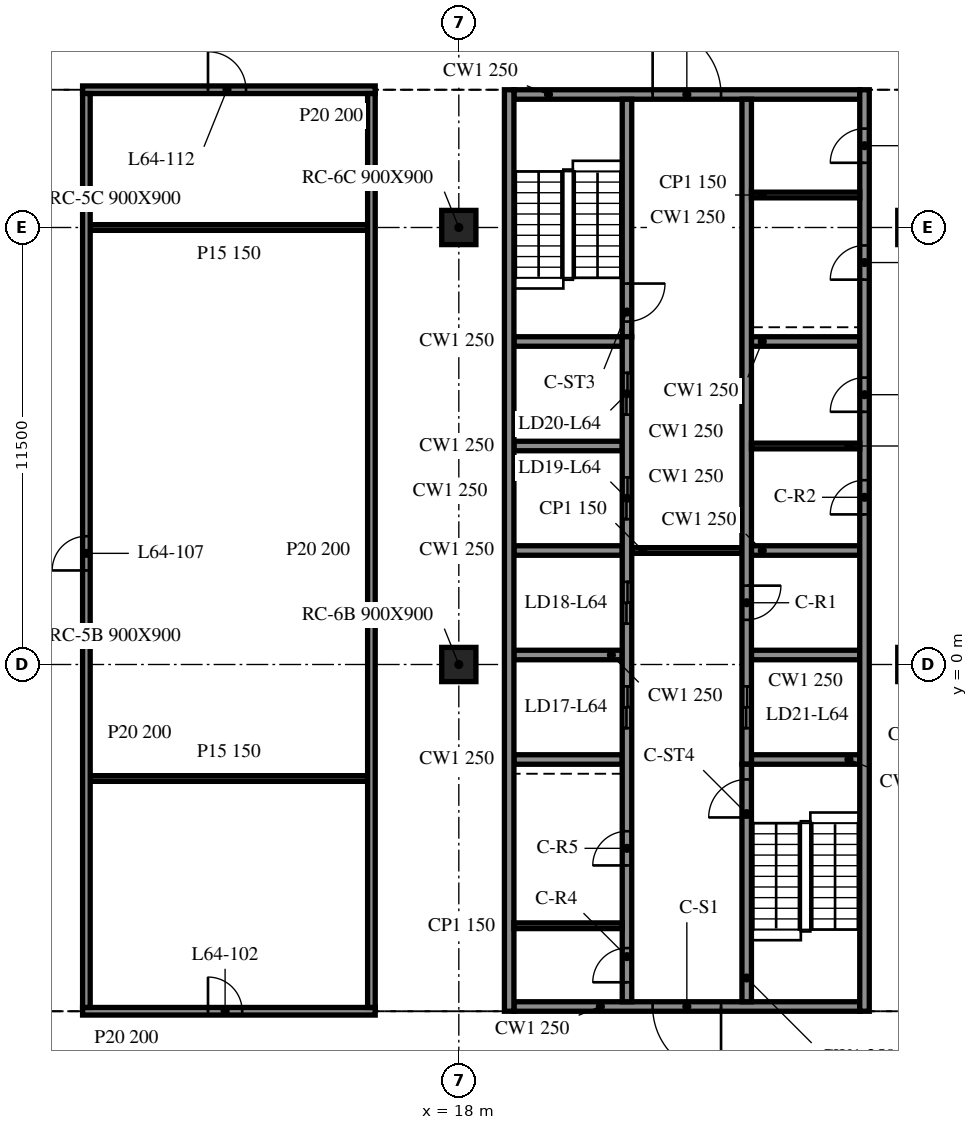
"""IFC4 building model, lengths in metres.
Left out: names, types, materials, properties, quantities, classifications, styles, units other than length and angle.
Written with IfcOpenShell. Run it as: python <this file> out.ifc"""

import sys

from ifc_helpers import new_model, si_unit, direction, frame, frame_2d, origin, origin_2d, place, context, subcontext, project, spatial, rectangle, extrude, element, fill, save


model = new_model("IFC4")
c1 = context("Model", 3, precision=1e-05, world=origin(), true_north=direction((0.0, 1.0)))
c2 = subcontext(c1, "Body", "Model", "MODEL_VIEW")
j1 = project(units=[si_unit("LENGTHUNIT", "METRE"), si_unit("PLANEANGLEUNIT", "RADIAN")], contexts=[c1])
p1 = place(None, origin())
s1 = spatial("IfcSite", under=j1, at=p1, CompositionType="ELEMENT")
p2 = place(p1, origin())
s2 = spatial("IfcBuilding", under=s1, at=p2, CompositionType="ELEMENT")
p3 = place(p2, frame((0.0, 0.0, 263.3)))
s3 = spatial("IfcBuildingStorey", under=s2, at=p3, CompositionType="ELEMENT", Elevation=263.3)
for number, where, z_axis, x_axis in (
    (1, (18.0, 0.0, -0.34), (0.0, 0.0, 1.0), (1.0, 0.0, 0.0)),
    (2, (18.0, 11.5, -0.34), (0.0, 0.0, 1.0), (1.0, 0.0, 0.0)),
):
    element("IfcColumn", number, at=place(p3, frame(where, z_axis=z_axis, x_axis=x_axis)), inside=s3, PredefinedType="COLUMN", context=c2, shape_type="SweptSolid", body=[
        extrude(rectangle(XDim=0.9, YDim=0.9, at=origin_2d()), origin(), (0.0, 0.0, 1.0), 3.8),
    ])
p4 = place(p3, frame((19.325, 15.125, 0.0), z_axis=(0.0, 0.0, 1.0), x_axis=(0.0, -1.0, 0.0)))
e3 = element("IfcWall", 3, at=p4, inside=s3, PredefinedType="SOLIDWALL", context=c2, shape_type="SweptSolid", body=[
    extrude(rectangle(XDim=24.25, YDim=0.25, at=frame_2d((12.125, 0.0))), origin(), (0.0, 0.0, 1.0), 3.46),
])
p5 = place(p3, frame((28.675, -9.125, 0.0), z_axis=(0.0, 0.0, 1.0), x_axis=(0.0, 1.0, 0.0)))
e4 = element("IfcWall", 4, at=p5, inside=s3, PredefinedType="SOLIDWALL", context=c2, shape_type="SweptSolid", body=[
    extrude(rectangle(XDim=24.25, YDim=0.25, at=frame_2d((12.125, 0.0))), origin(), (0.0, 0.0, 1.0), 3.46),
])
p6 = place(p5, frame((13.075, 0.0, 0.0)))
e5 = element("IfcOpeningElement", 5, at=p6, cuts=e4, PredefinedType="OPENING", context=c2, shape_type="SweptSolid", body=[
    extrude(rectangle(XDim=0.9, YDim=2.1, at=frame_2d((0.45, 1.05))), frame((0.0, 0.135, 0.0), z_axis=(0.0, -1.0, 0.0), x_axis=(1.0, 0.0, 0.0)), (0.0, 0.0, 1.0), 0.27),
])
p7 = place(p5, frame((15.775, 0.0, 0.0)))
e6 = element("IfcOpeningElement", 6, at=p7, cuts=e4, PredefinedType="OPENING", context=c2, shape_type="SweptSolid", body=[
    extrude(rectangle(XDim=0.9, YDim=2.1, at=frame_2d((0.45, 1.05))), frame((0.0, 0.135, 0.0), z_axis=(0.0, -1.0, 0.0), x_axis=(1.0, 0.0, 0.0)), (0.0, 0.0, 1.0), 0.27),
])
p8 = place(p5, frame((19.252, 0.0, 0.0)))
e7 = element("IfcOpeningElement", 7, at=p8, cuts=e4, PredefinedType="OPENING", context=c2, shape_type="SweptSolid", body=[
    extrude(rectangle(XDim=0.9, YDim=2.1, at=frame_2d((0.45, 1.05))), frame((0.0, 0.135, 0.0), z_axis=(0.0, -1.0, 0.0), x_axis=(1.0, 0.0, 0.0)), (0.0, 0.0, 1.0), 0.27),
])
p9 = place(p5, frame((22.327, 0.0, 0.0)))
e8 = element("IfcOpeningElement", 8, at=p9, cuts=e4, PredefinedType="OPENING", context=c2, shape_type="SweptSolid", body=[
    extrude(rectangle(XDim=0.9, YDim=2.1, at=frame_2d((0.45, 1.05))), frame((0.0, 0.135, 0.0), z_axis=(0.0, -1.0, 0.0), x_axis=(1.0, 0.0, 0.0)), (0.0, 0.0, 1.0), 0.27),
])
p10 = place(p3, frame((28.55, -9.0, 0.0), z_axis=(0.0, 0.0, 1.0), x_axis=(-1.0, 0.0, 0.0)))
e9 = element("IfcWall", 9, at=p10, inside=s3, PredefinedType="SOLIDWALL", context=c2, shape_type="SweptSolid", body=[
    extrude(rectangle(XDim=9.1, YDim=0.25, at=frame_2d((4.55, 0.0))), origin(), (0.0, 0.0, 1.0), 3.46),
])
p11 = place(p10, frame((3.65, 0.0, 0.0)))
e10 = element("IfcOpeningElement", 10, at=p11, cuts=e9, PredefinedType="OPENING", context=c2, shape_type="SweptSolid", body=[
    extrude(rectangle(XDim=1.8, YDim=2.1, at=frame_2d((0.9, 1.05))), frame((0.0, 0.135, 0.0), z_axis=(0.0, -1.0, 0.0), x_axis=(1.0, 0.0, 0.0)), (0.0, 0.0, 1.0), 0.27),
])
p12 = place(p3, frame((19.45, 15.0, 0.0), z_axis=(0.0, 0.0, 1.0), x_axis=(1.0, 0.0, 0.0)))
e11 = element("IfcWall", 11, at=p12, inside=s3, PredefinedType="SOLIDWALL", context=c2, shape_type="SweptSolid", body=[
    extrude(rectangle(XDim=9.1, YDim=0.25, at=frame_2d((4.55, 0.0))), origin(), (0.0, 0.0, 1.0), 3.46),
])
p13 = place(p12, frame((3.65, 0.0, 0.0)))
e12 = element("IfcOpeningElement", 12, at=p13, cuts=e11, PredefinedType="OPENING", context=c2, shape_type="SweptSolid", body=[
    extrude(rectangle(XDim=1.8, YDim=2.1, at=frame_2d((0.9, 1.05))), frame((0.0, 0.135, 0.0), z_axis=(0.0, -1.0, 0.0), x_axis=(1.0, 0.0, 0.0)), (0.0, 0.0, 1.0), 0.27),
])
p14 = place(p3, frame((22.425, -8.875, 0.0), z_axis=(0.0, 0.0, 1.0), x_axis=(0.0, 1.0, 0.0)))
e13 = element("IfcWall", 13, at=p14, inside=s3, PredefinedType="SOLIDWALL", context=c2, shape_type="SweptSolid", body=[
    extrude(rectangle(XDim=17.5, YDim=0.25, at=frame_2d((8.75, 0.0))), origin(), (0.0, 0.0, 1.0), 3.46),
])
p15 = place(p14, frame((7.2, 0.0, 0.0)))
e14 = element("IfcOpeningElement", 14, at=p15, cuts=e13, PredefinedType="OPENING", context=c2, shape_type="SweptSolid", body=[
    extrude(rectangle(XDim=1.1, YDim=2.1, at=frame_2d((0.55, 1.05))), frame((0.0, 0.135, 0.0), z_axis=(0.0, -1.0, 0.0), x_axis=(1.0, 0.0, 0.0)), (0.0, 0.0, 1.0), 0.27),
])
p16 = place(p14, frame((9.95, 0.0, 0.0)))
e15 = element("IfcOpeningElement", 15, at=p16, cuts=e13, PredefinedType="OPENING", context=c2, shape_type="SweptSolid", body=[
    extrude(rectangle(XDim=1.1, YDim=2.1, at=frame_2d((0.55, 1.05))), frame((0.0, 0.135, 0.0), z_axis=(0.0, -1.0, 0.0), x_axis=(1.0, 0.0, 0.0)), (0.0, 0.0, 1.0), 0.27),
])
p17 = place(p14, frame((12.7, 0.0, 0.0)))
e16 = element("IfcOpeningElement", 16, at=p17, cuts=e13, PredefinedType="OPENING", context=c2, shape_type="SweptSolid", body=[
    extrude(rectangle(XDim=1.1, YDim=2.1, at=frame_2d((0.55, 1.05))), frame((0.0, 0.135, 0.0), z_axis=(0.0, -1.0, 0.0), x_axis=(1.0, 0.0, 0.0)), (0.0, 0.0, 1.0), 0.27),
])
p18 = place(p14, frame((15.45, 0.0, 0.0)))
e17 = element("IfcOpeningElement", 17, at=p18, cuts=e13, PredefinedType="OPENING", context=c2, shape_type="SweptSolid", body=[
    extrude(rectangle(XDim=1.1, YDim=2.1, at=frame_2d((0.55, 1.05))), frame((0.0, 0.135, 0.0), z_axis=(0.0, -1.0, 0.0), x_axis=(1.0, 0.0, 0.0)), (0.0, 0.0, 1.0), 0.27),
])
p19 = place(p14, frame((0.512, 0.0, 0.0)))
e18 = element("IfcOpeningElement", 18, at=p19, cuts=e13, PredefinedType="OPENING", context=c2, shape_type="SweptSolid", body=[
    extrude(rectangle(XDim=0.9, YDim=2.1, at=frame_2d((0.45, 1.05))), frame((0.0, 0.135, 0.0), z_axis=(0.0, -1.0, 0.0), x_axis=(1.0, 0.0, 0.0)), (0.0, 0.0, 1.0), 0.27),
])
p20 = place(p14, frame((3.587, 0.0, 0.0)))
e19 = element("IfcOpeningElement", 19, at=p20, cuts=e13, PredefinedType="OPENING", context=c2, shape_type="SweptSolid", body=[
    extrude(rectangle(XDim=0.9, YDim=2.1, at=frame_2d((0.45, 1.05))), frame((0.0, 0.135, 0.0), z_axis=(0.0, -1.0, 0.0), x_axis=(1.0, 0.0, 0.0)), (0.0, 0.0, 1.0), 0.27),
])
p21 = place(p3, frame((22.425, 14.875, 0.0), z_axis=(0.0, 0.0, 1.0), x_axis=(0.0, -1.0, 0.0)))
e20 = element("IfcWall", 20, at=p21, inside=s3, PredefinedType="SOLIDWALL", context=c2, shape_type="SweptSolid", body=[
    extrude(rectangle(XDim=6.25, YDim=0.25, at=frame_2d((3.125, 0.0))), origin(), (0.0, 0.0, 1.0), 3.46),
])
p22 = place(p21, frame((4.85, 0.0, 0.0)))
e21 = element("IfcOpeningElement", 21, at=p22, cuts=e20, PredefinedType="OPENING", context=c2, shape_type="SweptSolid", body=[
    extrude(rectangle(XDim=1.0, YDim=2.1, at=frame_2d((0.5, 1.05))), frame((0.0, 0.135, 0.0), z_axis=(0.0, -1.0, 0.0), x_axis=(1.0, 0.0, 0.0)), (0.0, 0.0, 1.0), 0.27),
])
p23 = place(p3, frame((25.575, -8.875, 0.0), z_axis=(0.0, 0.0, 1.0), x_axis=(0.0, 1.0, 0.0)))
e22 = element("IfcWall", 22, at=p23, inside=s3, PredefinedType="SOLIDWALL", context=c2, shape_type="SweptSolid", body=[
    extrude(rectangle(XDim=6.25, YDim=0.25, at=frame_2d((3.125, 0.0))), origin(), (0.0, 0.0, 1.0), 3.46),
])
p24 = place(p23, frame((4.85, 0.0, 0.0)))
e23 = element("IfcOpeningElement", 23, at=p24, cuts=e22, PredefinedType="OPENING", context=c2, shape_type="SweptSolid", body=[
    extrude(rectangle(XDim=1.0, YDim=2.1, at=frame_2d((0.5, 1.05))), frame((0.0, 0.135, 0.0), z_axis=(0.0, -1.0, 0.0), x_axis=(1.0, 0.0, 0.0)), (0.0, 0.0, 1.0), 0.27),
])
p25 = place(p3, frame((25.575, 14.875, 0.0), z_axis=(0.0, 0.0, 1.0), x_axis=(0.0, -1.0, 0.0)))
e24 = element("IfcWall", 24, at=p25, inside=s3, PredefinedType="SOLIDWALL", context=c2, shape_type="SweptSolid", body=[
    extrude(rectangle(XDim=17.5, YDim=0.25, at=frame_2d((8.75, 0.0))), origin(), (0.0, 0.0, 1.0), 3.46),
])
p26 = place(p25, frame((15.45, 0.0, 0.0)))
e25 = element("IfcOpeningElement", 25, at=p26, cuts=e24, PredefinedType="OPENING", context=c2, shape_type="SweptSolid", body=[
    extrude(rectangle(XDim=1.1, YDim=2.1, at=frame_2d((0.55, 1.05))), frame((0.0, 0.135, 0.0), z_axis=(0.0, -1.0, 0.0), x_axis=(1.0, 0.0, 0.0)), (0.0, 0.0, 1.0), 0.27),
])
p27 = place(p25, frame((12.8, 0.0, 0.0)))
e26 = element("IfcOpeningElement", 26, at=p27, cuts=e24, PredefinedType="OPENING", context=c2, shape_type="SweptSolid", body=[
    extrude(rectangle(XDim=0.9, YDim=2.1, at=frame_2d((0.45, 1.05))), frame((0.0, 0.135, 0.0), z_axis=(0.0, -1.0, 0.0), x_axis=(1.0, 0.0, 0.0)), (0.0, 0.0, 1.0), 0.27),
])
for number, where, z_axis, x_axis in (
    (27, (19.45, -2.5, 0.0), (0.0, 0.0, 1.0), (1.0, 0.0, 0.0)),
    (28, (19.45, 0.25, 0.0), (0.0, 0.0, 1.0), (1.0, 0.0, 0.0)),
    (29, (19.45, 3.0, 0.0), (0.0, 0.0, 1.0), (1.0, 0.0, 0.0)),
    (30, (19.45, 5.75, 0.0), (0.0, 0.0, 1.0), (1.0, 0.0, 0.0)),
    (31, (19.45, 8.5, 0.0), (0.0, 0.0, 1.0), (1.0, 0.0, 0.0)),
    (32, (25.7, -2.5, 0.0), (0.0, 0.0, 1.0), (1.0, 0.0, 0.0)),
    (33, (25.7, 0.25, 0.0), (0.0, 0.0, 1.0), (1.0, 0.0, 0.0)),
    (34, (25.7, 3.0, 0.0), (0.0, 0.0, 1.0), (1.0, 0.0, 0.0)),
    (35, (25.7, 8.5, 0.0), (0.0, 0.0, 1.0), (1.0, 0.0, 0.0)),
):
    element("IfcWall", number, at=place(p3, frame(where, z_axis=z_axis, x_axis=x_axis)), inside=s3, PredefinedType="SOLIDWALL", context=c2, shape_type="SweptSolid", body=[
        extrude(rectangle(XDim=2.85, YDim=0.25, at=frame_2d((1.425, 0.0))), origin(), (0.0, 0.0, 1.0), 3.46),
    ])
p28 = place(p3, frame((22.55, 3.0, 0.0), z_axis=(0.0, 0.0, 1.0), x_axis=(1.0, 0.0, 0.0)))
e36 = element("IfcWall", 36, at=p28, inside=s3, PredefinedType="PARTITIONING", context=c2, shape_type="SweptSolid", body=[
    extrude(rectangle(XDim=2.9, YDim=0.15, at=frame_2d((1.45, 0.0))), origin(), (0.0, 0.0, 1.0), 3.46),
])
for number, where, z_axis, x_axis in (
    (37, (25.7, 5.75, 0.0), (0.0, 0.0, 1.0), (1.0, 0.0, 0.0)),
    (38, (19.45, -6.875, 0.0), (0.0, 0.0, 1.0), (1.0, 0.0, 0.0)),
    (39, (25.7, 12.355, 0.0), (0.0, 0.0, 1.0), (1.0, 0.0, 0.0)),
):
    element("IfcWall", number, at=place(p3, frame(where, z_axis=z_axis, x_axis=x_axis)), inside=s3, PredefinedType="PARTITIONING", context=c2, shape_type="SweptSolid", body=[
        extrude(rectangle(XDim=2.85, YDim=0.15, at=frame_2d((1.425, 0.0))), origin(), (0.0, 0.0, 1.0), 3.46),
    ])
p29 = place(p3, frame((8.1, -9.125, 0.0), z_axis=(0.0, 0.0, 1.0), x_axis=(1.0, 0.0, 0.0)))
e40 = element("IfcWall", 40, at=p29, inside=s3, PredefinedType="PARTITIONING", context=c2, shape_type="SweptSolid", body=[
    extrude(rectangle(XDim=7.7, YDim=0.2, at=frame_2d((3.85, 0.0))), origin(), (0.0, 0.0, 1.0), 3.46),
])
p30 = place(p29, frame((3.3, 0.0, 0.0)))
e41 = element("IfcOpeningElement", 41, at=p30, cuts=e40, PredefinedType="OPENING", context=c2, shape_type="SweptSolid", body=[
    extrude(rectangle(XDim=0.9, YDim=2.1, at=frame_2d((0.45, 1.05))), frame((0.0, 0.11, 0.0), z_axis=(0.0, -1.0, 0.0), x_axis=(1.0, 0.0, 0.0)), (0.0, 0.0, 1.0), 0.22),
])
for number, where, z_axis, x_axis in (
    (42, (8.3, -3.0, 0.0), (0.0, 0.0, 1.0), (1.0, 0.0, 0.0)),
    (43, (8.3, 11.5, 0.0), (0.0, 0.0, 1.0), (1.0, 0.0, 0.0)),
):
    element("IfcWall", number, at=place(p3, frame(where, z_axis=z_axis, x_axis=x_axis)), inside=s3, PredefinedType="PARTITIONING", context=c2, shape_type="SweptSolid", body=[
        extrude(rectangle(XDim=7.3, YDim=0.15, at=frame_2d((3.65, 0.0))), origin(), (0.0, 0.0, 1.0), 3.46),
    ])
p31 = place(p3, frame((8.1, 15.125, 0.0), z_axis=(0.0, 0.0, 1.0), x_axis=(1.0, 0.0, 0.0)))
e44 = element("IfcWall", 44, at=p31, inside=s3, PredefinedType="PARTITIONING", context=c2, shape_type="SweptSolid", body=[
    extrude(rectangle(XDim=7.7, YDim=0.2, at=frame_2d((3.85, 0.0))), origin(), (0.0, 0.0, 1.0), 3.46),
])
p32 = place(p31, frame((3.3, 0.0, 0.0)))
e45 = element("IfcOpeningElement", 45, at=p32, cuts=e44, PredefinedType="OPENING", context=c2, shape_type="SweptSolid", body=[
    extrude(rectangle(XDim=1.0, YDim=2.1, at=frame_2d((0.5, 1.05))), frame((0.0, 0.11, 0.0), z_axis=(0.0, -1.0, 0.0), x_axis=(1.0, 0.0, 0.0)), (0.0, 0.0, 1.0), 0.22),
])
p33 = place(p3, frame((8.2, -9.025, 0.0), z_axis=(0.0, 0.0, 1.0), x_axis=(0.0, 1.0, 0.0)))
e46 = element("IfcWall", 46, at=p33, inside=s3, PredefinedType="PARTITIONING", context=c2, shape_type="SweptSolid", body=[
    extrude(rectangle(XDim=24.05, YDim=0.2, at=frame_2d((12.025, 0.0))), origin(), (0.0, 0.0, 1.0), 3.46),
])
p34 = place(p33, frame((11.5, 0.0, 0.0)))
e47 = element("IfcOpeningElement", 47, at=p34, cuts=e46, PredefinedType="OPENING", context=c2, shape_type="SweptSolid", body=[
    extrude(rectangle(XDim=0.9, YDim=2.1, at=frame_2d((0.45, 1.05))), frame((0.0, 0.11, 0.0), z_axis=(0.0, -1.0, 0.0), x_axis=(1.0, 0.0, 0.0)), (0.0, 0.0, 1.0), 0.22),
])
p35 = place(p3, frame((15.7, -9.025, 0.0), z_axis=(0.0, 0.0, 1.0), x_axis=(0.0, 1.0, 0.0)))
e48 = element("IfcWall", 48, at=p35, inside=s3, PredefinedType="PARTITIONING", context=c2, shape_type="SweptSolid", body=[
    extrude(rectangle(XDim=24.05, YDim=0.2, at=frame_2d((12.025, 0.0))), origin(), (0.0, 0.0, 1.0), 3.46),
])
p36 = place(p11, origin())
e49 = element("IfcDoor", 49, at=p36, inside=s3, OperationType="DOUBLE_DOOR_SINGLE_SWING", PredefinedType="DOOR", context=c2, shape_type="SweptSolid", body=[
    extrude(rectangle(XDim=1.8, YDim=2.1, at=frame_2d((0.9, 1.05))), frame((0.0, 0.025, 0.0), z_axis=(0.0, -1.0, 0.0), x_axis=(1.0, 0.0, 0.0)), (0.0, 0.0, 1.0), 0.05),
])
fill(e10, e49)
p37 = place(p13, origin())
e50 = element("IfcDoor", 50, at=p37, inside=s3, OperationType="DOUBLE_DOOR_SINGLE_SWING", PredefinedType="DOOR", context=c2, shape_type="SweptSolid", body=[
    extrude(rectangle(XDim=1.8, YDim=2.1, at=frame_2d((0.9, 1.05))), frame((0.0, 0.025, 0.0), z_axis=(0.0, -1.0, 0.0), x_axis=(1.0, 0.0, 0.0)), (0.0, 0.0, 1.0), 0.05),
])
fill(e12, e50)
p38 = place(p26, origin())
e51 = element("IfcDoor", 51, at=p38, inside=s3, OperationType="DOUBLE_DOOR_SLIDING", PredefinedType="DOOR", context=c2, shape_type="SweptSolid", body=[
    extrude(rectangle(XDim=1.1, YDim=2.1, at=frame_2d((0.55, 1.05))), frame((0.0, 0.025, 0.0), z_axis=(0.0, -1.0, 0.0), x_axis=(1.0, 0.0, 0.0)), (0.0, 0.0, 1.0), 0.05),
])
fill(e25, e51)
p39 = place(p15, origin())
e52 = element("IfcDoor", 52, at=p39, inside=s3, OperationType="DOUBLE_DOOR_SLIDING", PredefinedType="DOOR", context=c2, shape_type="SweptSolid", body=[
    extrude(rectangle(XDim=1.1, YDim=2.1, at=frame_2d((0.55, 1.05))), frame((0.0, 0.025, 0.0), z_axis=(0.0, -1.0, 0.0), x_axis=(1.0, 0.0, 0.0)), (0.0, 0.0, 1.0), 0.05),
])
fill(e14, e52)
p40 = place(p16, origin())
e53 = element("IfcDoor", 53, at=p40, inside=s3, OperationType="DOUBLE_DOOR_SLIDING", PredefinedType="DOOR", context=c2, shape_type="SweptSolid", body=[
    extrude(rectangle(XDim=1.1, YDim=2.1, at=frame_2d((0.55, 1.05))), frame((0.0, 0.025, 0.0), z_axis=(0.0, -1.0, 0.0), x_axis=(1.0, 0.0, 0.0)), (0.0, 0.0, 1.0), 0.05),
])
fill(e15, e53)
p41 = place(p17, origin())
e54 = element("IfcDoor", 54, at=p41, inside=s3, OperationType="DOUBLE_DOOR_SLIDING", PredefinedType="DOOR", context=c2, shape_type="SweptSolid", body=[
    extrude(rectangle(XDim=1.1, YDim=2.1, at=frame_2d((0.55, 1.05))), frame((0.0, 0.025, 0.0), z_axis=(0.0, -1.0, 0.0), x_axis=(1.0, 0.0, 0.0)), (0.0, 0.0, 1.0), 0.05),
])
fill(e16, e54)
p42 = place(p18, origin())
e55 = element("IfcDoor", 55, at=p42, inside=s3, OperationType="DOUBLE_DOOR_SLIDING", PredefinedType="DOOR", context=c2, shape_type="SweptSolid", body=[
    extrude(rectangle(XDim=1.1, YDim=2.1, at=frame_2d((0.55, 1.05))), frame((0.0, 0.025, 0.0), z_axis=(0.0, -1.0, 0.0), x_axis=(1.0, 0.0, 0.0)), (0.0, 0.0, 1.0), 0.05),
])
fill(e17, e55)
p43 = place(p27, origin())
e56 = element("IfcDoor", 56, at=p43, inside=s3, OperationType="SINGLE_SWING_LEFT", PredefinedType="DOOR", context=c2, shape_type="SweptSolid", body=[
    extrude(rectangle(XDim=0.9, YDim=2.1, at=frame_2d((0.45, 1.05))), frame((0.0, 0.025, 0.0), z_axis=(0.0, -1.0, 0.0), x_axis=(1.0, 0.0, 0.0)), (0.0, 0.0, 1.0), 0.05),
])
fill(e26, e56)
p44 = place(p6, origin())
e57 = element("IfcDoor", 57, at=p44, inside=s3, OperationType="SINGLE_SWING_RIGHT", PredefinedType="DOOR", context=c2, shape_type="SweptSolid", body=[
    extrude(rectangle(XDim=0.9, YDim=2.1, at=frame_2d((0.45, 1.05))), frame((0.0, 0.025, 0.0), z_axis=(0.0, -1.0, 0.0), x_axis=(1.0, 0.0, 0.0)), (0.0, 0.0, 1.0), 0.05),
])
fill(e5, e57)
p45 = place(p7, origin())
e58 = element("IfcDoor", 58, at=p45, inside=s3, OperationType="SINGLE_SWING_LEFT", PredefinedType="DOOR", context=c2, shape_type="SweptSolid", body=[
    extrude(rectangle(XDim=0.9, YDim=2.1, at=frame_2d((0.45, 1.05))), frame((0.0, 0.025, 0.0), z_axis=(0.0, -1.0, 0.0), x_axis=(1.0, 0.0, 0.0)), (0.0, 0.0, 1.0), 0.05),
])
fill(e6, e58)
p46 = place(p19, origin())
e59 = element("IfcDoor", 59, at=p46, inside=s3, OperationType="SINGLE_SWING_RIGHT", PredefinedType="DOOR", context=c2, shape_type="SweptSolid", body=[
    extrude(rectangle(XDim=0.9, YDim=2.1, at=frame_2d((0.45, 1.05))), frame((0.0, 0.025, 0.0), z_axis=(0.0, -1.0, 0.0), x_axis=(1.0, 0.0, 0.0)), (0.0, 0.0, 1.0), 0.05),
])
fill(e18, e59)
p47 = place(p20, origin())
e60 = element("IfcDoor", 60, at=p47, inside=s3, OperationType="SINGLE_SWING_LEFT", PredefinedType="DOOR", context=c2, shape_type="SweptSolid", body=[
    extrude(rectangle(XDim=0.9, YDim=2.1, at=frame_2d((0.45, 1.05))), frame((0.0, 0.025, 0.0), z_axis=(0.0, -1.0, 0.0), x_axis=(1.0, 0.0, 0.0)), (0.0, 0.0, 1.0), 0.05),
])
fill(e19, e60)
p48 = place(p8, origin())
e61 = element("IfcDoor", 61, at=p48, inside=s3, OperationType="SINGLE_SWING_RIGHT", PredefinedType="DOOR", context=c2, shape_type="SweptSolid", body=[
    extrude(rectangle(XDim=0.9, YDim=2.1, at=frame_2d((0.45, 1.05))), frame((0.0, 0.025, 0.0), z_axis=(0.0, -1.0, 0.0), x_axis=(1.0, 0.0, 0.0)), (0.0, 0.0, 1.0), 0.05),
])
fill(e7, e61)
p49 = place(p9, origin())
e62 = element("IfcDoor", 62, at=p49, inside=s3, OperationType="SINGLE_SWING_LEFT", PredefinedType="DOOR", context=c2, shape_type="SweptSolid", body=[
    extrude(rectangle(XDim=0.9, YDim=2.1, at=frame_2d((0.45, 1.05))), frame((0.0, 0.025, 0.0), z_axis=(0.0, -1.0, 0.0), x_axis=(1.0, 0.0, 0.0)), (0.0, 0.0, 1.0), 0.05),
])
fill(e8, e62)
p50 = place(p22, origin())
e63 = element("IfcDoor", 63, at=p50, inside=s3, OperationType="SINGLE_SWING_RIGHT", PredefinedType="DOOR", context=c2, shape_type="SweptSolid", body=[
    extrude(rectangle(XDim=1.0, YDim=2.1, at=frame_2d((0.5, 1.05))), frame((0.0, 0.025, 0.0), z_axis=(0.0, -1.0, 0.0), x_axis=(1.0, 0.0, 0.0)), (0.0, 0.0, 1.0), 0.05),
])
fill(e21, e63)
p51 = place(p24, origin())
e64 = element("IfcDoor", 64, at=p51, inside=s3, OperationType="SINGLE_SWING_LEFT", PredefinedType="DOOR", context=c2, shape_type="SweptSolid", body=[
    extrude(rectangle(XDim=1.0, YDim=2.1, at=frame_2d((0.5, 1.05))), frame((0.0, 0.025, 0.0), z_axis=(0.0, -1.0, 0.0), x_axis=(1.0, 0.0, 0.0)), (0.0, 0.0, 1.0), 0.05),
])
fill(e23, e64)
p52 = place(p30, origin())
e65 = element("IfcDoor", 65, at=p52, inside=s3, OperationType="SINGLE_SWING_LEFT", PredefinedType="DOOR", context=c2, shape_type="SweptSolid", body=[
    extrude(rectangle(XDim=0.9, YDim=2.1, at=frame_2d((0.45, 1.05))), frame((0.0, 0.025, 0.0), z_axis=(0.0, -1.0, 0.0), x_axis=(1.0, 0.0, 0.0)), (0.0, 0.0, 1.0), 0.05),
])
fill(e41, e65)
p53 = place(p34, origin())
e66 = element("IfcDoor", 66, at=p53, inside=s3, OperationType="SINGLE_SWING_RIGHT", PredefinedType="DOOR", context=c2, shape_type="SweptSolid", body=[
    extrude(rectangle(XDim=0.9, YDim=2.1, at=frame_2d((0.45, 1.05))), frame((0.0, 0.025, 0.0), z_axis=(0.0, -1.0, 0.0), x_axis=(1.0, 0.0, 0.0)), (0.0, 0.0, 1.0), 0.05),
])
fill(e47, e66)
p54 = place(p32, origin())
e67 = element("IfcDoor", 67, at=p54, inside=s3, OperationType="SINGLE_SWING_RIGHT", PredefinedType="DOOR", context=c2, shape_type="SweptSolid", body=[
    extrude(rectangle(XDim=1.0, YDim=2.1, at=frame_2d((0.5, 1.05))), frame((0.0, 0.025, 0.0), z_axis=(0.0, -1.0, 0.0), x_axis=(1.0, 0.0, 0.0)), (0.0, 0.0, 1.0), 0.05),
])
fill(e45, e67)
save(model, sys.argv[1])
